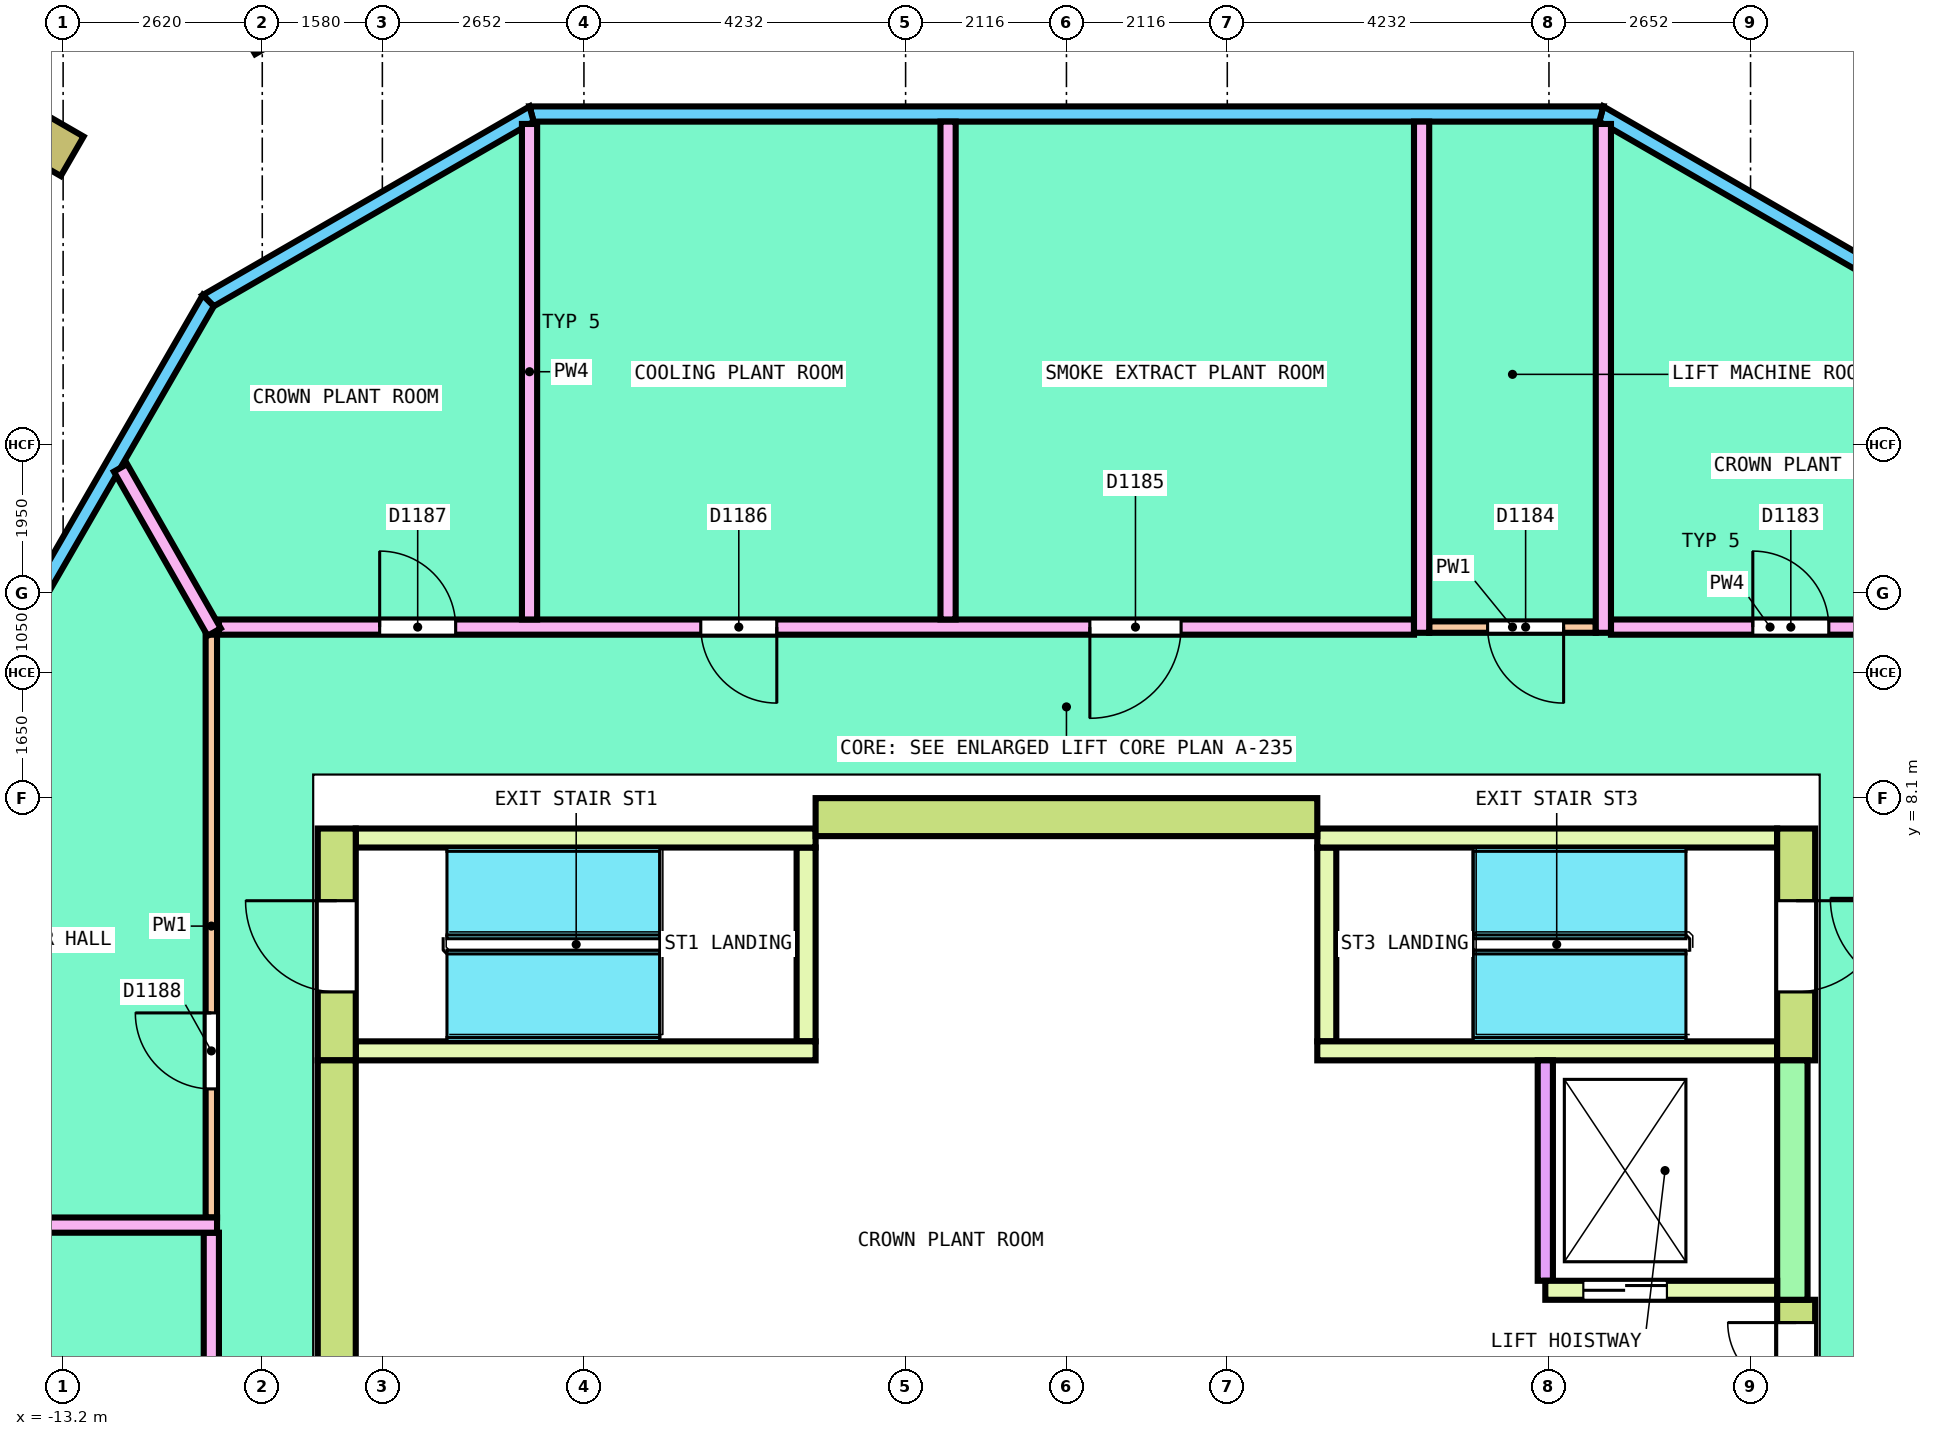
"""IFC4 building model, lengths in metres.
Left out: names, types, materials, properties, quantities, classifications, styles, units other than length and angle.
Written with IfcOpenShell. Run it as: python <this file> out.ifc"""

import sys

from ifc_helpers import new_model, si_unit, direction, frame, frame_2d, origin, origin_2d, place, context, subcontext, project, spatial, polyline, rectangle, hollow_rectangle, outline, extrude, element, fill, save


model = new_model("IFC4")
c1 = context("Model", 3, precision=1e-05, world=origin(), true_north=direction((0.0, 1.0)))
c2 = subcontext(c1, "Body", "Model", "MODEL_VIEW")
j1 = project(units=[si_unit("LENGTHUNIT", "METRE"), si_unit("PLANEANGLEUNIT", "RADIAN")], contexts=[c1])
p1 = place(None, origin())
s1 = spatial("IfcSite", under=j1, at=p1, CompositionType="ELEMENT")
p2 = place(p1, origin())
s2 = spatial("IfcBuilding", under=s1, at=p2, CompositionType="ELEMENT")
p3 = place(p2, frame((0.0, 0.0, 352.6)))
s3 = spatial("IfcBuildingStorey", under=s2, at=p3, CompositionType="ELEMENT", Elevation=352.6)
p4 = place(p3, frame((-13.34, 16.694, 0.0), z_axis=(0.0, 0.0, 1.0), x_axis=(-0.5, -0.866025403784, 0.0)))
e1 = element("IfcColumn", 1, at=p4, inside=s3, PredefinedType="COLUMN", context=c2, shape_type="SweptSolid", body=[
    extrude(hollow_rectangle(XDim=0.6, YDim=0.6, WallThickness=0.04, InnerFilletRadius=0.04, OuterFilletRadius=0.08, at=origin_2d()), origin(), (0.0, 0.0, 1.0), 4.0),
])
p5 = place(p3, frame((11.291, 14.644, 0.0), z_axis=(0.0, 0.0, 1.0), x_axis=(-0.86601671623, 0.500015046984, 0.0)))
e2 = element("IfcWall", 2, at=p5, inside=s3, PredefinedType="SOLIDWALL", context=c2, shape_type="SweptSolid", body=[
    extrude(outline(polyline([(-0.027, -0.1), (4.938, -0.1), (4.885, 0.1), (0.027, 0.1), (-0.027, -0.1)])), origin(), (0.0, 0.0, 1.0), 3.8),
])
p6 = place(p3, frame((7.037, 17.1, 0.0), z_axis=(0.0, 0.0, 1.0), x_axis=(-1.0, 0.0, 0.0)))
e3 = element("IfcWall", 3, at=p6, inside=s3, PredefinedType="SOLIDWALL", context=c2, shape_type="SweptSolid", body=[
    extrude(outline(polyline([(-0.027, -0.1), (14.101, -0.1), (14.047, 0.1), (0.027, 0.1), (-0.027, -0.1)])), origin(), (0.0, 0.0, 1.0), 3.8),
])
p7 = place(p3, frame((-7.037, 17.1, 0.0), z_axis=(0.0, 0.0, 1.0), x_axis=(-0.86601671623, -0.500015046984, 0.0)))
e4 = element("IfcWall", 4, at=p7, inside=s3, PredefinedType="SOLIDWALL", context=c2, shape_type="SweptSolid", body=[
    extrude(outline(polyline([(-0.027, -0.1), (4.938, -0.1), (4.885, 0.1), (0.027, 0.1), (-0.027, -0.1)])), origin(), (0.0, 0.0, 1.0), 3.8),
])
p8 = place(p3, frame((-11.291, 14.644, 0.0), z_axis=(0.0, 0.0, 1.0), x_axis=(-0.499991740577, -0.866030172312, 0.0)))
e5 = element("IfcWall", 5, at=p8, inside=s3, PredefinedType="SOLIDWALL", context=c2, shape_type="SweptSolid", body=[
    extrude(outline(polyline([(-0.027, -0.1), (14.101, -0.1), (14.047, 0.1), (0.027, 0.1), (-0.027, -0.1)])), origin(), (0.0, 0.0, 1.0), 3.8),
])
p9 = place(p3, frame((9.6, -7.85, 0.0), z_axis=(0.0, 0.0, 1.0), x_axis=(0.0, 1.0, 0.0)))
e6 = element("IfcWall", 6, at=p9, inside=s3, PredefinedType="SHEAR", context=c2, shape_type="SweptSolid", body=[
    extrude(rectangle(XDim=9.35, YDim=0.5, at=frame_2d((4.675, 0.0))), origin(), (0.0, 0.0, 1.0), 3.8),
])
p10 = place(p9, frame((8.15, 0.0, 0.0)))
e7 = element("IfcOpeningElement", 7, at=p10, cuts=e6, PredefinedType="OPENING", context=c2, shape_type="SweptSolid", body=[
    extrude(rectangle(XDim=0.9, YDim=2.1, at=frame_2d((0.45, 1.05))), frame((0.0, 0.26, 0.0), z_axis=(0.0, -1.0, 0.0), x_axis=(1.0, 0.0, 0.0)), (0.0, 0.0, 1.0), 0.52),
])
p11 = place(p3, frame((3.3, 7.85, 0.0), z_axis=(0.0, 0.0, 1.0), x_axis=(-1.0, 0.0, 0.0)))
e8 = element("IfcWall", 8, at=p11, inside=s3, PredefinedType="SHEAR", context=c2, shape_type="SweptSolid", body=[
    extrude(rectangle(XDim=6.6, YDim=0.5, at=frame_2d((3.3, 0.0))), origin(), (0.0, 0.0, 1.0), 3.8),
])
p12 = place(p3, frame((-9.6, 4.65, 0.0), z_axis=(0.0, 0.0, 1.0), x_axis=(0.0, -1.0, 0.0)))
e9 = element("IfcWall", 9, at=p12, inside=s3, PredefinedType="SHEAR", context=c2, shape_type="SweptSolid", body=[
    extrude(rectangle(XDim=9.3, YDim=0.5, at=frame_2d((4.65, 0.0))), origin(), (0.0, 0.0, 1.0), 3.8),
])
p13 = place(p3, frame((-9.6, 4.65, 0.0), z_axis=(0.0, 0.0, 1.0), x_axis=(0.0, 1.0, 0.0)))
e10 = element("IfcWall", 10, at=p13, inside=s3, PredefinedType="SHEAR", context=c2, shape_type="SweptSolid", body=[
    extrude(rectangle(XDim=3.05, YDim=0.5, at=frame_2d((1.525, 0.0))), origin(), (0.0, 0.0, 1.0), 3.8),
])
p14 = place(p13, frame((0.9, 0.0, 0.0)))
e11 = element("IfcOpeningElement", 11, at=p14, cuts=e10, PredefinedType="OPENING", context=c2, shape_type="SweptSolid", body=[
    extrude(rectangle(XDim=1.2, YDim=2.1, at=frame_2d((0.6, 1.05))), frame((0.0, 0.26, 0.0), z_axis=(0.0, -1.0, 0.0), x_axis=(1.0, 0.0, 0.0)), (0.0, 0.0, 1.0), 0.52),
])
p15 = place(p3, frame((-3.425, 4.9, 0.0), z_axis=(0.0, 0.0, 1.0), x_axis=(0.0, 1.0, 0.0)))
e12 = element("IfcWall", 12, at=p15, inside=s3, PredefinedType="SOLIDWALL", context=c2, shape_type="SweptSolid", body=[
    extrude(rectangle(XDim=2.55, YDim=0.25, at=frame_2d((1.275, 0.0))), origin(), (0.0, 0.0, 1.0), 3.8),
])
for number, where, z_axis, x_axis in (
    (13, (-9.35, 4.775, 0.0), (0.0, 0.0, 1.0), (1.0, 0.0, 0.0)),
    (14, (-9.35, 7.575, 0.0), (0.0, 0.0, 1.0), (1.0, 0.0, 0.0)),
):
    element("IfcWall", number, at=place(p3, frame(where, z_axis=z_axis, x_axis=x_axis)), inside=s3, PredefinedType="SOLIDWALL", context=c2, shape_type="SweptSolid", body=[
        extrude(rectangle(XDim=6.05, YDim=0.25, at=frame_2d((3.025, 0.0))), origin(), (0.0, 0.0, 1.0), 3.8),
    ])
p16 = place(p3, frame((9.6, 4.65, 0.0), z_axis=(0.0, 0.0, 1.0), x_axis=(0.0, 1.0, 0.0)))
e15 = element("IfcWall", 15, at=p16, inside=s3, PredefinedType="SHEAR", context=c2, shape_type="SweptSolid", body=[
    extrude(rectangle(XDim=3.05, YDim=0.5, at=frame_2d((1.525, 0.0))), origin(), (0.0, 0.0, 1.0), 3.8),
])
p17 = place(p16, frame((0.9, 0.0, 0.0)))
e16 = element("IfcOpeningElement", 16, at=p17, cuts=e15, PredefinedType="OPENING", context=c2, shape_type="SweptSolid", body=[
    extrude(rectangle(XDim=1.2, YDim=2.1, at=frame_2d((0.6, 1.05))), frame((0.0, 0.26, 0.0), z_axis=(0.0, -1.0, 0.0), x_axis=(1.0, 0.0, 0.0)), (0.0, 0.0, 1.0), 0.52),
])
p18 = place(p3, frame((3.425, 4.9, 0.0), z_axis=(0.0, 0.0, 1.0), x_axis=(0.0, 1.0, 0.0)))
e17 = element("IfcWall", 17, at=p18, inside=s3, PredefinedType="SOLIDWALL", context=c2, shape_type="SweptSolid", body=[
    extrude(rectangle(XDim=2.55, YDim=0.25, at=frame_2d((1.275, 0.0))), origin(), (0.0, 0.0, 1.0), 3.8),
])
for number, where, z_axis, x_axis in (
    (18, (3.3, 4.775, 0.0), (0.0, 0.0, 1.0), (1.0, 0.0, 0.0)),
    (19, (3.3, 7.575, 0.0), (0.0, 0.0, 1.0), (1.0, 0.0, 0.0)),
):
    element("IfcWall", number, at=place(p3, frame(where, z_axis=z_axis, x_axis=x_axis)), inside=s3, PredefinedType="SOLIDWALL", context=c2, shape_type="SweptSolid", body=[
        extrude(rectangle(XDim=6.05, YDim=0.25, at=frame_2d((3.025, 0.0))), origin(), (0.0, 0.0, 1.0), 3.8),
    ])
p19 = place(p3, frame((6.3, 1.625, 0.0), z_axis=(0.0, 0.0, 1.0), x_axis=(1.0, 0.0, 0.0)))
e20 = element("IfcWall", 20, at=p19, inside=s3, PredefinedType="SOLIDWALL", context=c2, shape_type="SweptSolid", body=[
    extrude(rectangle(XDim=3.05, YDim=0.25, at=frame_2d((1.525, 0.0))), origin(), (0.0, 0.0, 1.0), 3.8),
])
p20 = place(p19, frame((0.5, 0.0, 0.0)))
e21 = element("IfcOpeningElement", 21, at=p20, cuts=e20, PredefinedType="OPENING", context=c2, shape_type="SweptSolid", body=[
    extrude(rectangle(XDim=1.1, YDim=2.1, at=frame_2d((0.55, 1.05))), frame((0.0, 0.135, 0.0), z_axis=(0.0, -1.0, 0.0), x_axis=(1.0, 0.0, 0.0)), (0.0, 0.0, 1.0), 0.27),
])
p21 = place(p3, frame((6.3, 1.75, 0.0), z_axis=(0.0, 0.0, 1.0), x_axis=(0.0, 1.0, 0.0)))
e22 = element("IfcWall", 22, at=p21, inside=s3, PredefinedType="SOLIDWALL", context=c2, shape_type="SweptSolid", body=[
    extrude(rectangle(XDim=2.9, YDim=0.2, at=frame_2d((1.45, 0.0))), origin(), (0.0, 0.0, 1.0), 3.8),
])
p22 = place(p3, frame((9.55, 1.5, 0.0), z_axis=(0.0, 0.0, 1.0), x_axis=(0.0, 1.0, 0.0)))
e23 = element("IfcWall", 23, at=p22, inside=s3, PredefinedType="SHEAR", context=c2, shape_type="SweptSolid", body=[
    extrude(rectangle(XDim=3.15, YDim=0.4, at=frame_2d((1.575, 0.0))), origin(), (0.0, 0.0, 1.0), 3.8),
])
p23 = place(p3, frame((4.772, 10.35, 0.0), z_axis=(0.0, 0.0, 1.0), x_axis=(1.0, 0.0, 0.0)))
e24 = element("IfcWall", 24, at=p23, inside=s3, PredefinedType="PARTITIONING", context=c2, shape_type="SweptSolid", body=[
    extrude(rectangle(XDim=2.192, YDim=0.15, at=frame_2d((1.096, 0.0))), origin(), (0.0, 0.0, 1.0), 3.3),
])
p24 = place(p23, frame((0.769, 0.0, 0.0)))
e25 = element("IfcOpeningElement", 25, at=p24, cuts=e24, PredefinedType="OPENING", context=c2, shape_type="SweptSolid", body=[
    extrude(rectangle(XDim=1.0, YDim=2.1, at=frame_2d((0.5, 1.05))), frame((0.0, 0.085, 0.0), z_axis=(0.0, -1.0, 0.0), x_axis=(1.0, 0.0, 0.0)), (0.0, 0.0, 1.0), 0.17),
])
p25 = place(p3, frame((-11.25, 2.583, 0.0), z_axis=(0.0, 0.0, 1.0), x_axis=(0.0, 1.0, 0.0)))
e26 = element("IfcWall", 26, at=p25, inside=s3, PredefinedType="PARTITIONING", context=c2, shape_type="SweptSolid", body=[
    extrude(rectangle(XDim=7.667, YDim=0.15, at=frame_2d((3.834, 0.0))), origin(), (0.0, 0.0, 1.0), 3.3),
])
p26 = place(p25, frame((1.691, 0.0, 0.0)))
e27 = element("IfcOpeningElement", 27, at=p26, cuts=e26, PredefinedType="OPENING", context=c2, shape_type="SweptSolid", body=[
    extrude(rectangle(XDim=1.0, YDim=2.1, at=frame_2d((0.5, 1.05))), frame((0.0, 0.085, 0.0), z_axis=(0.0, -1.0, 0.0), x_axis=(1.0, 0.0, 0.0)), (0.0, 0.0, 1.0), 0.17),
])
p27 = place(p3, frame((-11.15, 10.35, 0.0), z_axis=(0.0, 0.0, 1.0), x_axis=(1.0, 0.0, 0.0)))
e28 = element("IfcWall", 28, at=p27, inside=s3, PredefinedType="PARTITIONING", context=c2, shape_type="SweptSolid", body=[
    extrude(rectangle(XDim=15.722, YDim=0.2, at=frame_2d((7.861, 0.0))), origin(), (0.0, 0.0, 1.0), 3.3),
])
p28 = place(p27, frame((11.458, 0.0, 0.0)))
e29 = element("IfcOpeningElement", 29, at=p28, cuts=e28, PredefinedType="OPENING", context=c2, shape_type="SweptSolid", body=[
    extrude(rectangle(XDim=1.2, YDim=2.1, at=frame_2d((0.6, 1.05))), frame((0.0, 0.11, 0.0), z_axis=(0.0, -1.0, 0.0), x_axis=(1.0, 0.0, 0.0)), (0.0, 0.0, 1.0), 0.22),
])
p29 = place(p27, frame((6.339, 0.0, 0.0)))
e30 = element("IfcOpeningElement", 30, at=p29, cuts=e28, PredefinedType="OPENING", context=c2, shape_type="SweptSolid", body=[
    extrude(rectangle(XDim=1.0, YDim=2.1, at=frame_2d((0.5, 1.05))), frame((0.0, 0.11, 0.0), z_axis=(0.0, -1.0, 0.0), x_axis=(1.0, 0.0, 0.0)), (0.0, 0.0, 1.0), 0.22),
])
p30 = place(p27, frame((2.115, 0.0, 0.0)))
e31 = element("IfcOpeningElement", 31, at=p30, cuts=e28, PredefinedType="OPENING", context=c2, shape_type="SweptSolid", body=[
    extrude(rectangle(XDim=1.0, YDim=2.1, at=frame_2d((0.5, 1.05))), frame((0.0, 0.11, 0.0), z_axis=(0.0, -1.0, 0.0), x_axis=(1.0, 0.0, 0.0)), (0.0, 0.0, 1.0), 0.22),
])
p31 = place(p3, frame((7.164, 10.35, 0.0), z_axis=(0.0, 0.0, 1.0), x_axis=(1.0, 0.0, 0.0)))
e32 = element("IfcWall", 32, at=p31, inside=s3, PredefinedType="PARTITIONING", context=c2, shape_type="SweptSolid", body=[
    extrude(rectangle(XDim=4.186, YDim=0.2, at=frame_2d((2.093, 0.0))), origin(), (0.0, 0.0, 1.0), 3.3),
])
p32 = place(p31, frame((1.866, 0.0, 0.0)))
e33 = element("IfcOpeningElement", 33, at=p32, cuts=e32, PredefinedType="OPENING", context=c2, shape_type="SweptSolid", body=[
    extrude(rectangle(XDim=1.0, YDim=2.1, at=frame_2d((0.5, 1.05))), frame((0.0, 0.11, 0.0), z_axis=(0.0, -1.0, 0.0), x_axis=(1.0, 0.0, 0.0)), (0.0, 0.0, 1.0), 0.22),
])
p33 = place(p3, frame((-11.25, -7.151, 0.0), z_axis=(0.0, 0.0, 1.0), x_axis=(0.0, 1.0, 0.0)))
e34 = element("IfcWall", 34, at=p33, inside=s3, PredefinedType="PARTITIONING", context=c2, shape_type="SweptSolid", body=[
    extrude(rectangle(XDim=9.534, YDim=0.2, at=frame_2d((4.767, 0.0))), origin(), (0.0, 0.0, 1.0), 3.3),
])
p34 = place(p33, frame((2.208, 0.0, 0.0)))
e35 = element("IfcOpeningElement", 35, at=p34, cuts=e34, PredefinedType="OPENING", context=c2, shape_type="SweptSolid", body=[
    extrude(rectangle(XDim=1.2, YDim=2.1, at=frame_2d((0.6, 1.05))), frame((0.0, 0.11, 0.0), z_axis=(0.0, -1.0, 0.0), x_axis=(1.0, 0.0, 0.0)), (0.0, 0.0, 1.0), 0.22),
])
p35 = place(p3, frame((7.064, 10.275, 0.0), z_axis=(0.0, 0.0, 1.0), x_axis=(0.0, 1.0, 0.0)))
e36 = element("IfcWall", 36, at=p35, inside=s3, PredefinedType="PARTITIONING", context=c2, shape_type="SweptSolid", body=[
    extrude(rectangle(XDim=6.694, YDim=0.2, at=frame_2d((3.347, 0.0))), origin(), (0.0, 0.0, 1.0), 3.3),
])
p36 = place(p3, frame((4.672, 10.275, 0.0), z_axis=(0.0, 0.0, 1.0), x_axis=(0.0, 1.0, 0.0)))
e37 = element("IfcWall", 37, at=p36, inside=s3, PredefinedType="PARTITIONING", context=c2, shape_type="SweptSolid", body=[
    extrude(rectangle(XDim=6.725, YDim=0.2, at=frame_2d((3.363, 0.0))), origin(), (0.0, 0.0, 1.0), 3.3),
])
p37 = place(p3, frame((-1.557, 10.45, 0.0), z_axis=(0.0, 0.0, 1.0), x_axis=(0.0, 1.0, 0.0)))
e38 = element("IfcWall", 38, at=p37, inside=s3, PredefinedType="PARTITIONING", context=c2, shape_type="SweptSolid", body=[
    extrude(rectangle(XDim=6.55, YDim=0.2, at=frame_2d((3.275, 0.0))), origin(), (0.0, 0.0, 1.0), 3.3),
])
p38 = place(p3, frame((-7.064, 10.45, 0.0), z_axis=(0.0, 0.0, 1.0), x_axis=(0.0, 1.0, 0.0)))
e39 = element("IfcWall", 39, at=p38, inside=s3, PredefinedType="PARTITIONING", context=c2, shape_type="SweptSolid", body=[
    extrude(rectangle(XDim=6.519, YDim=0.2, at=frame_2d((3.26, 0.0))), origin(), (0.0, 0.0, 1.0), 3.3),
])
p39 = place(p3, frame((-12.445, 12.445, 0.0), z_axis=(0.0, 0.0, 1.0), x_axis=(0.495282327186, -0.868732073989, 0.0)))
e40 = element("IfcWall", 40, at=p39, inside=s3, PredefinedType="PARTITIONING", context=c2, shape_type="SweptSolid", body=[
    extrude(rectangle(XDim=2.487, YDim=0.2, at=frame_2d((1.243, 0.0))), origin(), (0.0, 0.0, 1.0), 3.3),
])
p40 = place(p3, frame((-18.197, 2.483, 0.0), z_axis=(0.0, 0.0, 1.0), x_axis=(1.0, 0.0, 0.0)))
e41 = element("IfcWall", 41, at=p40, inside=s3, PredefinedType="PARTITIONING", context=c2, shape_type="SweptSolid", body=[
    extrude(rectangle(XDim=7.021, YDim=0.2, at=frame_2d((3.511, 0.0))), origin(), (0.0, 0.0, 1.0), 3.3),
])
p41 = place(p14, origin())
e42 = element("IfcDoor", 42, at=p41, inside=s3, OperationType="SINGLE_SWING_LEFT", PredefinedType="DOOR", context=c2, shape_type="SweptSolid", body=[
    extrude(rectangle(XDim=1.2, YDim=2.1, at=frame_2d((0.6, 1.05))), frame((0.0, 0.2, 0.0), z_axis=(0.0, -1.0, 0.0), x_axis=(1.0, 0.0, 0.0)), (0.0, 0.0, 1.0), 0.4),
])
fill(e11, e42)
p42 = place(p17, origin())
e43 = element("IfcDoor", 43, at=p42, inside=s3, OperationType="SINGLE_SWING_LEFT", PredefinedType="DOOR", context=c2, shape_type="SweptSolid", body=[
    extrude(rectangle(XDim=1.2, YDim=2.1, at=frame_2d((0.6, 1.05))), frame((0.0, 0.2, 0.0), z_axis=(0.0, -1.0, 0.0), x_axis=(1.0, 0.0, 0.0)), (0.0, 0.0, 1.0), 0.4),
])
fill(e16, e43)
p43 = place(p20, origin())
e44 = element("IfcDoor", 44, at=p43, inside=s3, OperationType="DOUBLE_DOOR_SLIDING", PredefinedType="DOOR", context=c2, shape_type="SweptSolid", body=[
    extrude(rectangle(XDim=1.1, YDim=2.1, at=frame_2d((0.55, 1.05))), frame((0.0, 0.075, 0.0), z_axis=(0.0, -1.0, 0.0), x_axis=(1.0, 0.0, 0.0)), (0.0, 0.0, 1.0), 0.15),
])
fill(e21, e44)
p44 = place(p10, origin())
e45 = element("IfcDoor", 45, at=p44, inside=s3, OperationType="SINGLE_SWING_LEFT", PredefinedType="DOOR", context=c2, shape_type="SweptSolid", body=[
    extrude(rectangle(XDim=0.9, YDim=2.1, at=frame_2d((0.45, 1.05))), frame((0.0, 0.2, 0.0), z_axis=(0.0, -1.0, 0.0), x_axis=(1.0, 0.0, 0.0)), (0.0, 0.0, 1.0), 0.4),
])
fill(e7, e45)
p45 = place(p32, origin())
e46 = element("IfcDoor", 46, at=p45, inside=s3, OperationType="SINGLE_SWING_RIGHT", PredefinedType="DOOR", context=c2, shape_type="SweptSolid", body=[
    extrude(rectangle(XDim=1.0, YDim=2.1, at=frame_2d((0.5, 1.05))), frame((0.0, 0.025, 0.0), z_axis=(0.0, -1.0, 0.0), x_axis=(1.0, 0.0, 0.0)), (0.0, 0.0, 1.0), 0.05),
])
fill(e33, e46)
p46 = place(p24, origin())
e47 = element("IfcDoor", 47, at=p46, inside=s3, OperationType="SINGLE_SWING_RIGHT", PredefinedType="DOOR", context=c2, shape_type="SweptSolid", body=[
    extrude(rectangle(XDim=1.0, YDim=2.1, at=frame_2d((0.5, 1.05))), frame((0.0, 0.025, 0.0), z_axis=(0.0, -1.0, 0.0), x_axis=(1.0, 0.0, 0.0)), (0.0, 0.0, 1.0), 0.05),
])
fill(e25, e47)
p47 = place(p28, origin())
e48 = element("IfcDoor", 48, at=p47, inside=s3, OperationType="DOUBLE_DOOR_SINGLE_SWING", PredefinedType="DOOR", context=c2, shape_type="SweptSolid", body=[
    extrude(rectangle(XDim=1.2, YDim=2.1, at=frame_2d((0.6, 1.05))), frame((0.0, 0.025, 0.0), z_axis=(0.0, -1.0, 0.0), x_axis=(1.0, 0.0, 0.0)), (0.0, 0.0, 1.0), 0.05),
])
fill(e29, e48)
p48 = place(p29, origin())
e49 = element("IfcDoor", 49, at=p48, inside=s3, OperationType="SINGLE_SWING_RIGHT", PredefinedType="DOOR", context=c2, shape_type="SweptSolid", body=[
    extrude(rectangle(XDim=1.0, YDim=2.1, at=frame_2d((0.5, 1.05))), frame((0.0, 0.025, 0.0), z_axis=(0.0, -1.0, 0.0), x_axis=(1.0, 0.0, 0.0)), (0.0, 0.0, 1.0), 0.05),
])
fill(e30, e49)
p49 = place(p30, origin())
e50 = element("IfcDoor", 50, at=p49, inside=s3, OperationType="SINGLE_SWING_RIGHT", PredefinedType="DOOR", context=c2, shape_type="SweptSolid", body=[
    extrude(rectangle(XDim=1.0, YDim=2.1, at=frame_2d((0.5, 1.05))), frame((0.0, 0.025, 0.0), z_axis=(0.0, -1.0, 0.0), x_axis=(1.0, 0.0, 0.0)), (0.0, 0.0, 1.0), 0.05),
])
fill(e31, e50)
p50 = place(p26, origin())
e51 = element("IfcDoor", 51, at=p50, inside=s3, OperationType="SINGLE_SWING_RIGHT", PredefinedType="DOOR", context=c2, shape_type="SweptSolid", body=[
    extrude(rectangle(XDim=1.0, YDim=2.1, at=frame_2d((0.5, 1.05))), frame((0.0, 0.025, 0.0), z_axis=(0.0, -1.0, 0.0), x_axis=(1.0, 0.0, 0.0)), (0.0, 0.0, 1.0), 0.05),
])
fill(e27, e51)
save(model, sys.argv[1])
